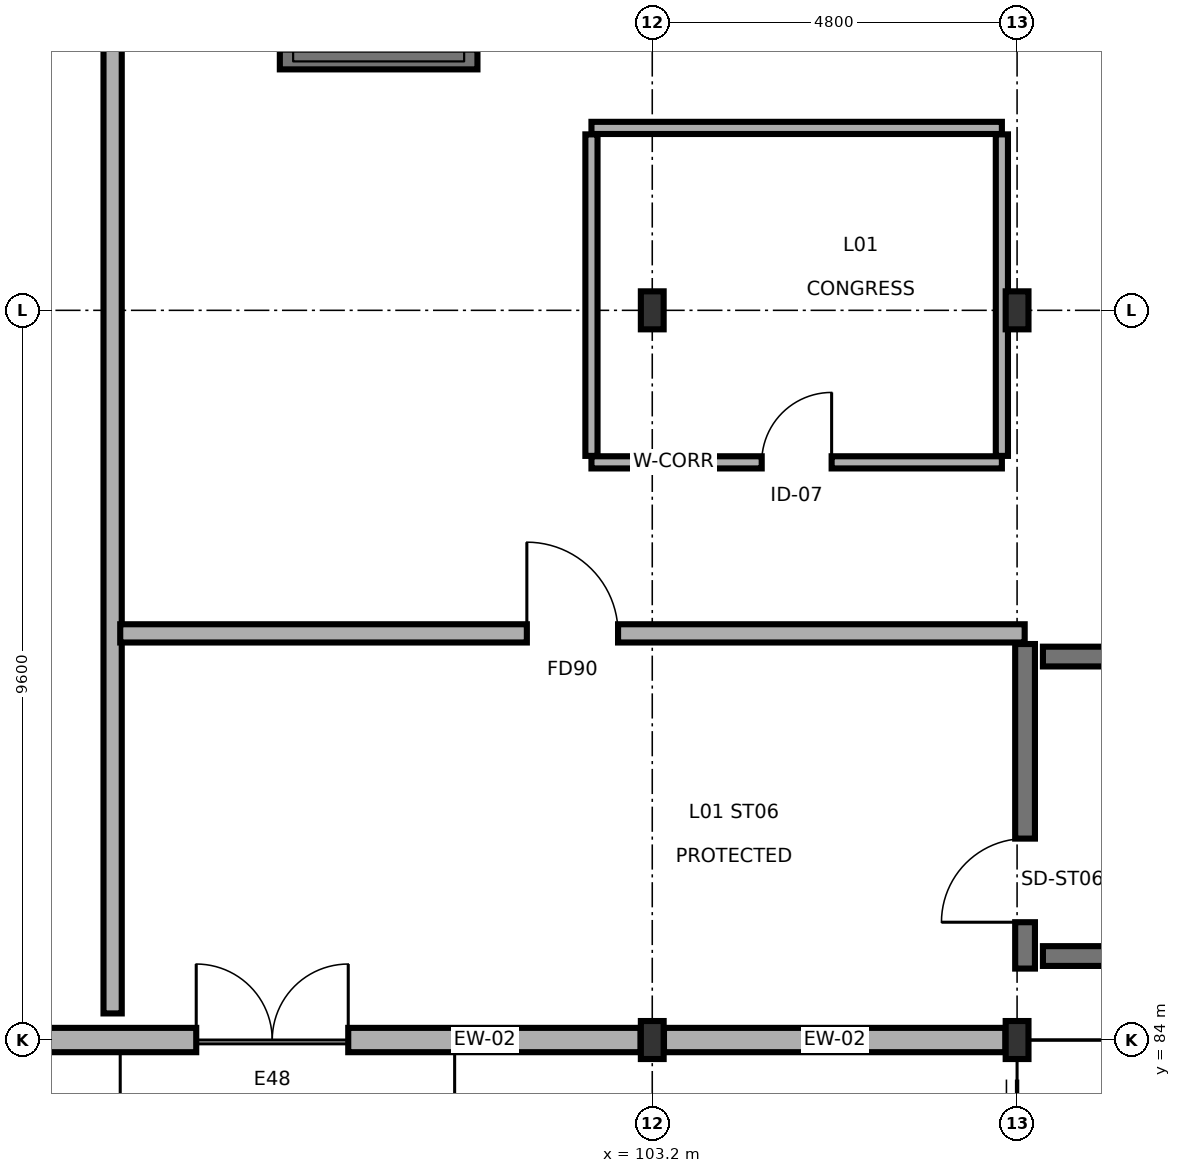
"""IFC4 building model, lengths in metres.
Left out: names, types, materials, properties, quantities, classifications, styles, units other than length and angle.
Written with IfcOpenShell. Run it as: python <this file> out.ifc"""

import sys

from ifc_helpers import new_model, si_unit, direction, frame, frame_2d, origin, origin_2d, place, context, subcontext, project, spatial, rectangle, i_section, extrude, element, fill, save


model = new_model("IFC4")
c1 = context("Model", 3, precision=1e-05, world=origin(), true_north=direction((0.0, 1.0)))
c2 = subcontext(c1, "Body", "Model", "MODEL_VIEW")
j1 = project(units=[si_unit("LENGTHUNIT", "METRE"), si_unit("PLANEANGLEUNIT", "RADIAN")], contexts=[c1])
p1 = place(None, origin())
s1 = spatial("IfcSite", under=j1, at=p1, CompositionType="ELEMENT")
p2 = place(p1, origin())
s2 = spatial("IfcBuilding", under=s1, at=p2, CompositionType="ELEMENT")
p3 = place(p2, origin())
s3 = spatial("IfcBuildingStorey", under=s2, at=p3, CompositionType="ELEMENT", Elevation=0.0)
for number, where, z_axis, x_axis in (
    (1, (103.2, 84.0, 0.0), (0.0, 0.0, 1.0), (1.0, 0.0, 0.0)),
    (2, (103.2, 93.6, 0.0), (0.0, 0.0, 1.0), (1.0, 0.0, 0.0)),
    (3, (108.0, 84.0, 0.0), (0.0, 0.0, 1.0), (1.0, 0.0, 0.0)),
    (4, (108.0, 93.6, 0.0), (0.0, 0.0, 1.0), (1.0, 0.0, 0.0)),
):
    element("IfcColumn", number, at=place(p3, frame(where, z_axis=z_axis, x_axis=x_axis)), inside=s3, PredefinedType="COLUMN", context=c2, shape_type="SweptSolid", body=[
        extrude(i_section(OverallWidth=0.3, OverallDepth=0.5, WebThickness=0.014, FlangeThickness=0.028, FilletRadius=0.027, at=origin_2d()), origin(), (0.0, 0.0, 1.0), 5.4),
    ])
p4 = place(p3, frame((93.754, 84.0, 0.0), z_axis=(0.0, 0.0, 1.0), x_axis=(1.0, 0.0, 0.0)))
e5 = element("IfcWall", 5, at=p4, inside=s3, PredefinedType="SOLIDWALL", context=c2, shape_type="SweptSolid", body=[
    extrude(rectangle(XDim=9.292, YDim=0.32, at=frame_2d((4.646, 0.0))), origin(), (0.0, 0.0, 1.0), 4.625),
])
p5 = place(p4, frame((3.446, 0.0, 0.0)))
e6 = element("IfcOpeningElement", 6, at=p5, cuts=e5, PredefinedType="OPENING", context=c2, shape_type="SweptSolid", body=[
    extrude(rectangle(XDim=2.0, YDim=2.3, at=frame_2d((1.0, 1.15))), frame((0.0, 0.17, 0.0), z_axis=(0.0, -1.0, 0.0), x_axis=(1.0, 0.0, 0.0)), (0.0, 0.0, 1.0), 0.34),
])
p6 = place(p3, frame((103.354, 84.0, 0.0), z_axis=(0.0, 0.0, 1.0), x_axis=(1.0, 0.0, 0.0)))
e7 = element("IfcWall", 7, at=p6, inside=s3, PredefinedType="SOLIDWALL", context=c2, shape_type="SweptSolid", body=[
    extrude(rectangle(XDim=4.492, YDim=0.32, at=frame_2d((2.246, 0.0))), origin(), (0.0, 0.0, 1.0), 4.625),
])
p7 = place(p3, frame((108.105, 84.94, 0.0), z_axis=(0.0, 0.0, 1.0), x_axis=(0.0, 1.0, 0.0)))
e8 = element("IfcWall", 8, at=p7, inside=s3, PredefinedType="SHEAR", context=c2, shape_type="SweptSolid", body=[
    extrude(rectangle(XDim=4.27, YDim=0.26, at=frame_2d((2.135, 0.0))), origin(), (0.0, 0.0, 1.0), 5.14),
])
p8 = place(p7, frame((0.61, 0.0, 0.0)))
e9 = element("IfcOpeningElement", 9, at=p8, cuts=e8, PredefinedType="OPENING", context=c2, shape_type="SweptSolid", body=[
    extrude(rectangle(XDim=1.1, YDim=2.2, at=frame_2d((0.55, 1.1))), frame((0.0, 0.14, 0.0), z_axis=(0.0, -1.0, 0.0), x_axis=(1.0, 0.0, 0.0)), (0.0, 0.0, 1.0), 0.28),
])
for number, where, z_axis, x_axis in (
    (10, (108.34, 85.105, 0.0), (0.0, 0.0, 1.0), (1.0, 0.0, 0.0)),
    (11, (108.34, 89.045, 0.0), (0.0, 0.0, 1.0), (1.0, 0.0, 0.0)),
):
    element("IfcWall", number, at=place(p3, frame(where, z_axis=z_axis, x_axis=x_axis)), inside=s3, PredefinedType="SHEAR", context=c2, shape_type="SweptSolid", body=[
        extrude(rectangle(XDim=8.52, YDim=0.26, at=frame_2d((4.26, 0.0))), origin(), (0.0, 0.0, 1.0), 5.14),
    ])
p9 = place(p3, frame((98.3, 96.9, 0.0), z_axis=(0.0, 0.0, 1.0), x_axis=(1.0, 0.0, 0.0)))
e12 = element("IfcWall", 12, at=p9, inside=s3, PredefinedType="SHEAR", context=c2, shape_type="SweptSolid", body=[
    extrude(rectangle(XDim=2.6, YDim=0.26, at=frame_2d((1.3, 0.0))), origin(), (0.0, 0.0, 1.0), 5.14),
])
p10 = place(p3, frame((96.1, 84.35, 0.0), z_axis=(0.0, 0.0, 1.0), x_axis=(0.0, 1.0, 0.0)))
e13 = element("IfcWall", 13, at=p10, inside=s3, PredefinedType="SOLIDWALL", context=c2, shape_type="SweptSolid", body=[
    extrude(rectangle(XDim=18.625, YDim=0.24, at=frame_2d((9.312, 0.0))), origin(), (0.0, 0.0, 1.0), 4.685),
])
p11 = place(p3, frame((102.4, 91.6, 0.0), z_axis=(0.0, 0.0, 1.0), x_axis=(1.0, 0.0, 0.0)))
e14 = element("IfcWall", 14, at=p11, inside=s3, PredefinedType="PARTITIONING", context=c2, shape_type="SweptSolid", body=[
    extrude(rectangle(XDim=5.4, YDim=0.16, at=frame_2d((2.7, 0.0))), origin(), (0.0, 0.0, 1.0), 4.625),
])
p12 = place(p11, frame((2.24, 0.0, 0.0)))
e15 = element("IfcOpeningElement", 15, at=p12, cuts=e14, PredefinedType="OPENING", context=c2, shape_type="SweptSolid", body=[
    extrude(rectangle(XDim=0.92, YDim=2.1, at=frame_2d((0.46, 1.05))), frame((0.0, 0.09, 0.0), z_axis=(0.0, -1.0, 0.0), x_axis=(1.0, 0.0, 0.0)), (0.0, 0.0, 1.0), 0.18),
])
p13 = place(p3, frame((102.4, 96.0, 0.0), z_axis=(0.0, 0.0, 1.0), x_axis=(1.0, 0.0, 0.0)))
e16 = element("IfcWall", 16, at=p13, inside=s3, PredefinedType="PARTITIONING", context=c2, shape_type="SweptSolid", body=[
    extrude(rectangle(XDim=5.4, YDim=0.16, at=frame_2d((2.7, 0.0))), origin(), (0.0, 0.0, 1.0), 4.625),
])
p14 = place(p3, frame((102.4, 91.685, 0.0), z_axis=(0.0, 0.0, 1.0), x_axis=(0.0, 1.0, 0.0)))
e17 = element("IfcWall", 17, at=p14, inside=s3, PredefinedType="PARTITIONING", context=c2, shape_type="SweptSolid", body=[
    extrude(rectangle(XDim=4.23, YDim=0.16, at=frame_2d((2.115, 0.0))), origin(), (0.0, 0.0, 1.0), 4.685),
])
p15 = place(p3, frame((107.8, 91.685, 0.0), z_axis=(0.0, 0.0, 1.0), x_axis=(0.0, 1.0, 0.0)))
e18 = element("IfcWall", 18, at=p15, inside=s3, PredefinedType="PARTITIONING", context=c2, shape_type="SweptSolid", body=[
    extrude(rectangle(XDim=4.23, YDim=0.16, at=frame_2d((2.115, 0.0))), origin(), (0.0, 0.0, 1.0), 4.625),
])
p16 = place(p3, frame((96.2, 89.35, 0.0), z_axis=(0.0, 0.0, 1.0), x_axis=(1.0, 0.0, 0.0)))
e19 = element("IfcWall", 19, at=p16, inside=s3, PredefinedType="SOLIDWALL", context=c2, shape_type="SweptSolid", body=[
    extrude(rectangle(XDim=11.9, YDim=0.24, at=frame_2d((5.95, 0.0))), origin(), (0.0, 0.0, 1.0), 4.625),
])
p17 = place(p16, frame((5.35, 0.0, 0.0)))
e20 = element("IfcOpeningElement", 20, at=p17, cuts=e19, PredefinedType="OPENING", context=c2, shape_type="SweptSolid", body=[
    extrude(rectangle(XDim=1.2, YDim=2.2, at=frame_2d((0.6, 1.1))), frame((0.0, 0.13, 0.0), z_axis=(0.0, -1.0, 0.0), x_axis=(1.0, 0.0, 0.0)), (0.0, 0.0, 1.0), 0.26),
])
p18 = place(p5, frame((2.0, 0.0, 0.0), z_axis=(0.0, 0.0, 1.0), x_axis=(-1.0, 0.0, 0.0)))
e21 = element("IfcDoor", 21, at=p18, inside=s3, OperationType="DOUBLE_DOOR_SINGLE_SWING", PredefinedType="DOOR", context=c2, shape_type="SweptSolid", body=[
    extrude(rectangle(XDim=2.0, YDim=2.3, at=frame_2d((1.0, 1.15))), frame((0.0, 0.025, 0.0), z_axis=(0.0, -1.0, 0.0), x_axis=(1.0, 0.0, 0.0)), (0.0, 0.0, 1.0), 0.05),
])
fill(e6, e21)
p19 = place(p8, origin())
e22 = element("IfcDoor", 22, at=p19, inside=s3, OperationType="SINGLE_SWING_LEFT", PredefinedType="DOOR", context=c2, shape_type="SweptSolid", body=[
    extrude(rectangle(XDim=1.1, YDim=2.2, at=frame_2d((0.55, 1.1))), frame((0.0, 0.025, 0.0), z_axis=(0.0, -1.0, 0.0), x_axis=(1.0, 0.0, 0.0)), (0.0, 0.0, 1.0), 0.05),
])
fill(e9, e22)
p20 = place(p12, origin())
e23 = element("IfcDoor", 23, at=p20, inside=s3, OperationType="SINGLE_SWING_RIGHT", PredefinedType="DOOR", context=c2, shape_type="SweptSolid", body=[
    extrude(rectangle(XDim=0.92, YDim=2.1, at=frame_2d((0.46, 1.05))), frame((0.0, 0.025, 0.0), z_axis=(0.0, -1.0, 0.0), x_axis=(1.0, 0.0, 0.0)), (0.0, 0.0, 1.0), 0.05),
])
fill(e15, e23)
p21 = place(p17, origin())
e24 = element("IfcDoor", 24, at=p21, inside=s3, OperationType="SINGLE_SWING_LEFT", PredefinedType="DOOR", context=c2, shape_type="SweptSolid", body=[
    extrude(rectangle(XDim=1.2, YDim=2.2, at=frame_2d((0.6, 1.1))), frame((0.0, 0.025, 0.0), z_axis=(0.0, -1.0, 0.0), x_axis=(1.0, 0.0, 0.0)), (0.0, 0.0, 1.0), 0.05),
])
fill(e20, e24)
save(model, sys.argv[1])
